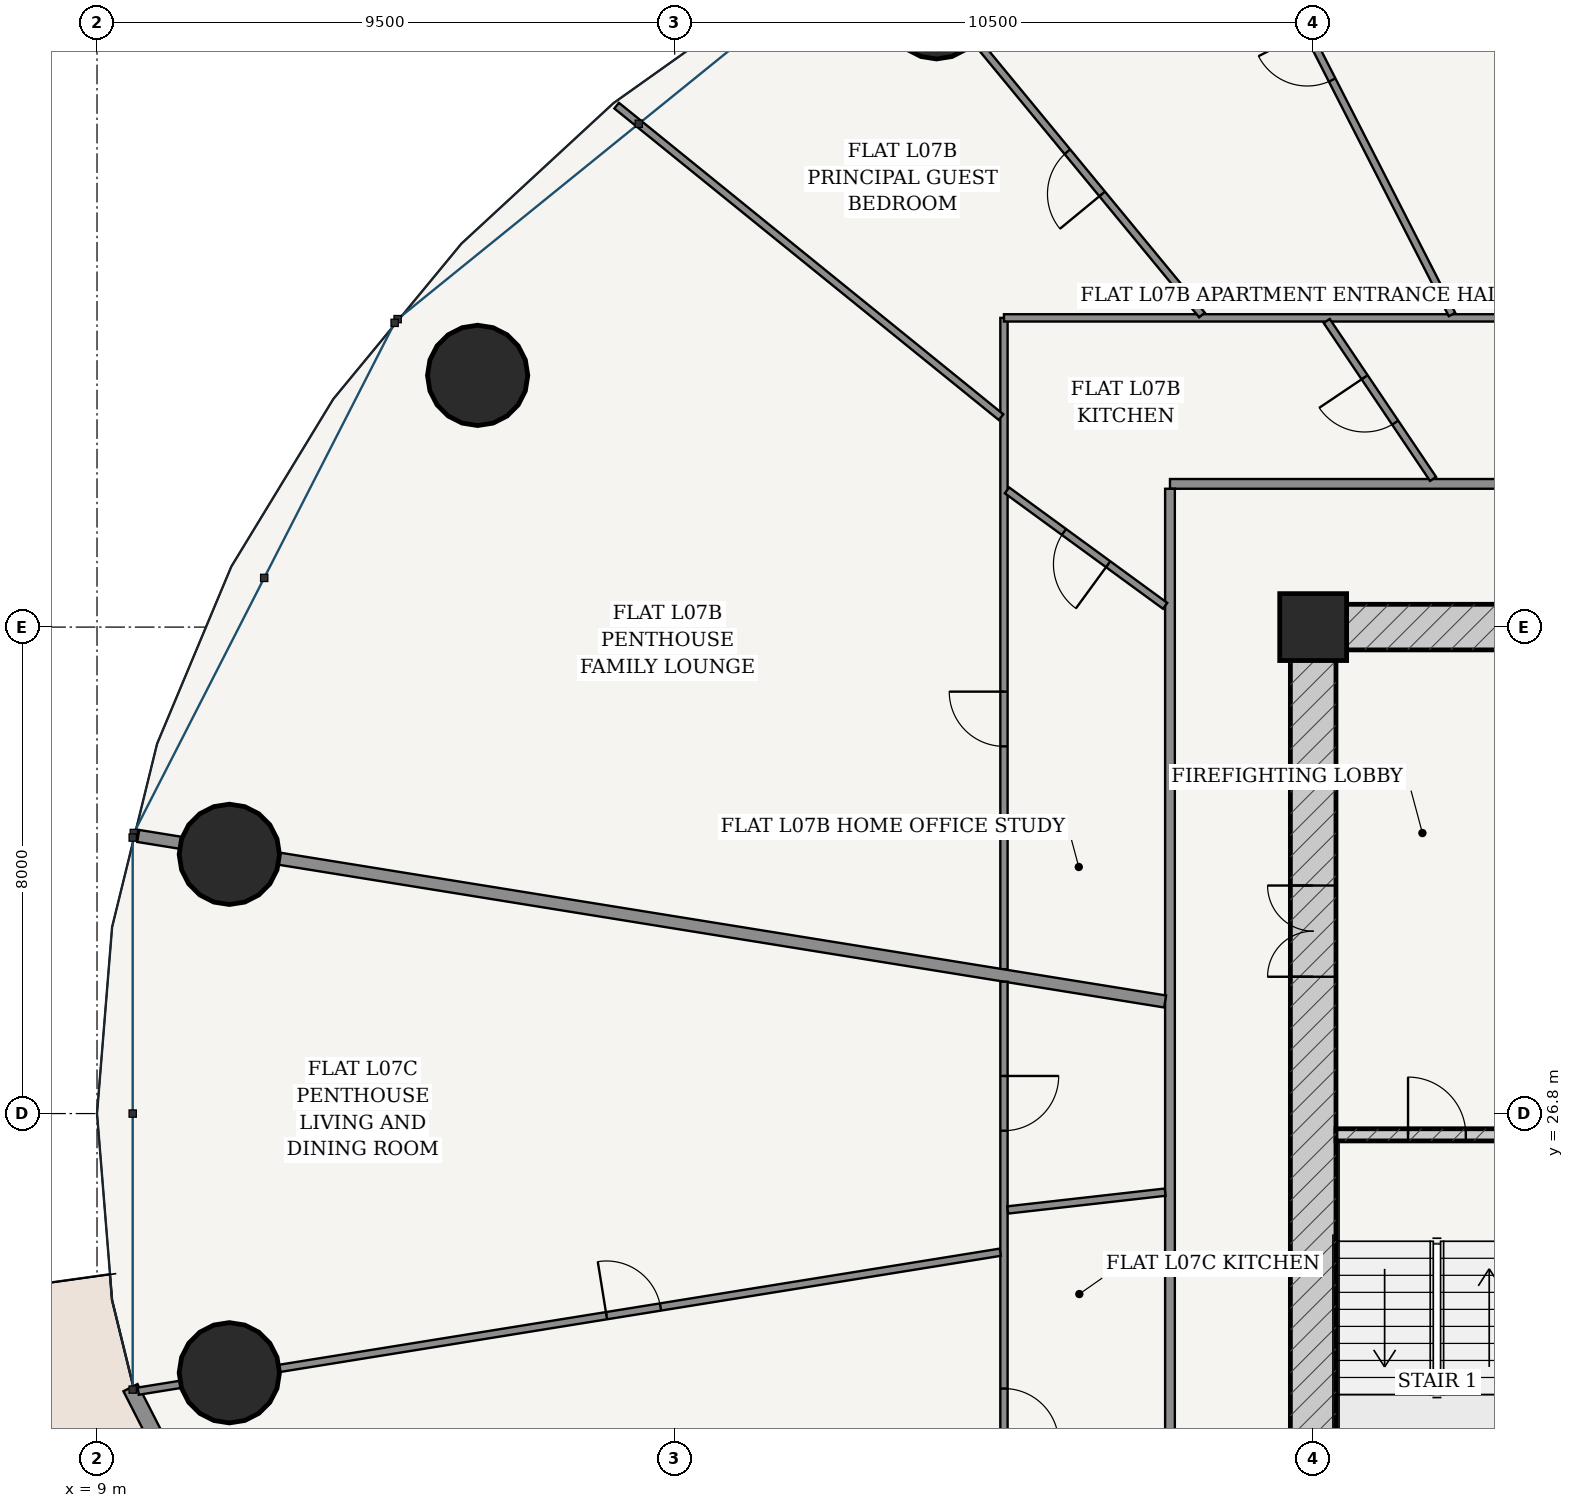
"""IFC4 building model, lengths in metres.
Left out: names, types, materials, properties, quantities, classifications, styles, units other than length and angle.
Written with IfcOpenShell. Run it as: python <this file> out.ifc"""

import sys

from ifc_helpers import new_model, si_unit, direction, frame, frame_2d, origin, origin_2d, place, context, subcontext, project, spatial, rectangle, hollow_circle, extrude, source, transform, mapped, element, fill, save


model = new_model("IFC4")
c1 = context("Model", 3, precision=1e-05, world=origin(), true_north=direction((-0.2419218956, 0.970295726276)))
c2 = subcontext(c1, "Body", "Model", "MODEL_VIEW")
j1 = project(units=[si_unit("LENGTHUNIT", "METRE"), si_unit("PLANEANGLEUNIT", "RADIAN")], contexts=[c1])
p1 = place(None, origin())
s1 = spatial("IfcSite", under=j1, at=p1, CompositionType="ELEMENT")
p2 = place(p1, origin())
s2 = spatial("IfcBuilding", under=s1, at=p2, CompositionType="ELEMENT")
p3 = place(p2, frame((0.0, 0.0, 31.2)))
s3 = spatial("IfcBuildingStorey", under=s2, at=p3, CompositionType="ELEMENT", Elevation=31.2)
p4 = place(p3, frame((29.0, 34.8, 0.0), z_axis=(0.0, 0.0, 1.0), x_axis=(1.0, 0.0, 0.0)))
e1 = element("IfcColumn", 1, at=p4, inside=s3, PredefinedType="COLUMN", context=c2, shape_type="SweptSolid", body=[
    extrude(rectangle(XDim=1.1, YDim=1.1, at=origin_2d()), origin(), (0.0, 0.0, 1.0), 3.6),
])
p5 = place(p3, frame((28.625, 34.8, 0.0), z_axis=(0.0, 0.0, 1.0), x_axis=(1.0, 0.0, 0.0)))
e2 = element("IfcWall", 2, at=p5, inside=s3, PredefinedType="SHEAR", context=c2, shape_type="SweptSolid", body=[
    extrude(rectangle(XDim=18.75, YDim=0.75, at=frame_2d((9.375, 0.0))), origin(), (0.0, 0.0, 1.0), 3.32),
])
p6 = place(p5, frame((8.95, 0.0, 0.0)))
e3 = element("IfcOpeningElement", 3, at=p6, cuts=e2, PredefinedType="OPENING", context=c2, shape_type="SweptSolid", body=[
    extrude(rectangle(XDim=0.85, YDim=2.1, at=frame_2d((0.425, 1.05))), frame((0.0, 0.385, 0.0), z_axis=(0.0, -1.0, 0.0), x_axis=(1.0, 0.0, 0.0)), (0.0, 0.0, 1.0), 0.77),
])
p7 = place(p3, frame((29.0, 19.175, 0.0), z_axis=(0.0, 0.0, 1.0), x_axis=(0.0, 1.0, 0.0)))
e4 = element("IfcWall", 4, at=p7, inside=s3, PredefinedType="SHEAR", context=c2, shape_type="SweptSolid", body=[
    extrude(rectangle(XDim=15.25, YDim=0.75, at=frame_2d((7.625, 0.0))), origin(), (0.0, 0.0, 1.0), 3.32),
])
p8 = place(p7, frame((9.875, 0.0, 0.0)))
e5 = element("IfcOpeningElement", 5, at=p8, cuts=e4, PredefinedType="OPENING", context=c2, shape_type="SweptSolid", body=[
    extrude(rectangle(XDim=1.5, YDim=2.2, at=frame_2d((0.75, 1.1))), frame((0.0, 0.385, 0.0), z_axis=(0.0, -1.0, 0.0), x_axis=(1.0, 0.0, 0.0)), (0.0, 0.0, 1.0), 0.77),
])
p9 = place(p3, frame((29.375, 26.45, 0.0), z_axis=(0.0, 0.0, 1.0), x_axis=(1.0, 0.0, 0.0)))
e6 = element("IfcWall", 6, at=p9, inside=s3, PredefinedType="SOLIDWALL", context=c2, shape_type="SweptSolid", body=[
    extrude(rectangle(XDim=3.32, YDim=0.2, at=frame_2d((1.66, 0.0))), origin(), (0.0, 0.0, 1.0), 3.32),
])
p10 = place(p9, frame((1.185, 0.0, 0.0)))
e7 = element("IfcOpeningElement", 7, at=p10, cuts=e6, PredefinedType="OPENING", context=c2, shape_type="SweptSolid", body=[
    extrude(rectangle(XDim=0.95, YDim=2.15, at=frame_2d((0.475, 1.075))), frame((0.0, 0.11, 0.0), z_axis=(0.0, -1.0, 0.0), x_axis=(1.0, 0.0, 0.0)), (0.0, 0.0, 1.0), 0.22),
])
for number, where, z_axis, x_axis in (
    (8, (22.805, 44.968, 0.0), (0.0, 0.0, 1.0), (1.0, 0.0, 0.0)),
    (9, (15.259, 38.939, 0.0), (0.0, 0.0, 1.0), (1.0, 0.0, 0.0)),
    (10, (11.176, 31.063, 0.0), (0.0, 0.0, 1.0), (1.0, 0.0, 0.0)),
    (11, (11.176, 22.537, 0.0), (0.0, 0.0, 1.0), (1.0, 0.0, 0.0)),
):
    element("IfcColumn", number, at=place(p3, frame(where, z_axis=z_axis, x_axis=x_axis)), inside=s3, PredefinedType="COLUMN", context=c2, shape_type="SweptSolid", body=[
        extrude(hollow_circle(Radius=0.825, WallThickness=0.05, at=origin_2d()), origin(), (0.0, 0.0, 1.0), 3.6),
    ])
p11 = place(p3, frame((9.55, 22.292, 0.0), z_axis=(0.0, 0.0, 1.0), x_axis=(0.455220575541, -0.890378698984, 0.0)))
e12 = element("IfcWall", 12, at=p11, inside=s3, PredefinedType="SOLIDWALL", context=c2, shape_type="SweptSolid", body=[
    extrude(rectangle(XDim=9.662, YDim=0.26, at=frame_2d((4.831, 0.0))), origin(), (0.0, 0.0, 1.0), 3.32),
])
p12 = place(p11, frame((4.156, 0.0, 0.0)))
e13 = element("IfcOpeningElement", 13, at=p12, cuts=e12, PredefinedType="OPENING", context=c2, shape_type="SweptSolid", body=[
    extrude(rectangle(XDim=1.35, YDim=2.2, at=frame_2d((0.675, 1.1))), frame((0.0, 0.14, 0.0), z_axis=(0.0, -1.0, 0.0), x_axis=(1.0, 0.0, 0.0)), (0.0, 0.0, 1.0), 0.28),
])
p13 = place(p3, frame((26.645, 37.155, 0.0), z_axis=(0.0, 0.0, 1.0), x_axis=(1.0, 0.0, 0.0)))
e14 = element("IfcWall", 14, at=p13, inside=s3, PredefinedType="PARTITIONING", context=c2, shape_type="SweptSolid", body=[
    extrude(rectangle(XDim=22.71, YDim=0.16, at=frame_2d((11.355, 0.0))), origin(), (0.0, 0.0, 1.0), 2.688),
])
p14 = place(p13, frame((7.446, 0.0, 0.0)))
e15 = element("IfcOpeningElement", 15, at=p14, cuts=e14, PredefinedType="OPENING", context=c2, shape_type="SweptSolid", body=[
    extrude(rectangle(XDim=0.98, YDim=2.2, at=frame_2d((0.49, 1.1))), frame((0.0, 0.09, 0.0), z_axis=(0.0, -1.0, 0.0), x_axis=(1.0, 0.0, 0.0)), (0.0, 0.0, 1.0), 0.18),
])
p15 = place(p3, frame((26.645, 16.525, 0.0), z_axis=(0.0, 0.0, 1.0), x_axis=(0.0, 1.0, 0.0)))
e16 = element("IfcWall", 16, at=p15, inside=s3, PredefinedType="PARTITIONING", context=c2, shape_type="SweptSolid", body=[
    extrude(rectangle(XDim=20.55, YDim=0.16, at=frame_2d((10.275, 0.0))), origin(), (0.0, 0.0, 1.0), 2.688),
])
p16 = place(p3, frame((23.915, 29.172, 0.0), z_axis=(0.0, 0.0, 1.0), x_axis=(0.0, 1.0, 0.0)))
e17 = element("IfcWall", 17, at=p16, inside=s3, PredefinedType="PARTITIONING", context=c2, shape_type="SweptSolid", body=[
    extrude(rectangle(XDim=10.713, YDim=0.12, at=frame_2d((5.356, 0.0))), origin(), (0.0, 0.0, 1.0), 2.688),
])
p17 = place(p16, frame((3.666, 0.0, 0.0)))
e18 = element("IfcOpeningElement", 18, at=p17, cuts=e17, PredefinedType="OPENING", context=c2, shape_type="SweptSolid", body=[
    extrude(rectangle(XDim=0.9, YDim=2.15, at=frame_2d((0.45, 1.075))), frame((0.0, 0.07, 0.0), z_axis=(0.0, -1.0, 0.0), x_axis=(1.0, 0.0, 0.0)), (0.0, 0.0, 1.0), 0.14),
])
p18 = place(p3, frame((23.915, 39.885, 0.0), z_axis=(0.0, 0.0, 1.0), x_axis=(1.0, 0.0, 0.0)))
e19 = element("IfcWall", 19, at=p18, inside=s3, PredefinedType="PARTITIONING", context=c2, shape_type="SweptSolid", body=[
    extrude(rectangle(XDim=20.671, YDim=0.12, at=frame_2d((10.336, 0.0))), origin(), (0.0, 0.0, 1.0), 2.688),
])
p19 = place(p18, frame((10.444, 0.0, 0.0)))
e20 = element("IfcOpeningElement", 20, at=p19, cuts=e19, PredefinedType="OPENING", context=c2, shape_type="SweptSolid", body=[
    extrude(rectangle(XDim=0.9, YDim=2.15, at=frame_2d((0.45, 1.075))), frame((0.0, 0.07, 0.0), z_axis=(0.0, -1.0, 0.0), x_axis=(1.0, 0.0, 0.0)), (0.0, 0.0, 1.0), 0.14),
])
p20 = place(p3, frame((31.283, 39.94, 0.0), z_axis=(0.0, 0.0, 1.0), x_axis=(-0.455131303234, 0.890424335256, 0.0)))
e21 = element("IfcWall", 21, at=p20, inside=s3, PredefinedType="PARTITIONING", context=c2, shape_type="SweptSolid", body=[
    extrude(rectangle(XDim=9.562, YDim=0.12, at=frame_2d((4.781, 0.0))), origin(), (0.0, 0.0, 1.0), 2.762),
])
p21 = place(p20, frame((4.331, 0.0, 0.0)))
e22 = element("IfcOpeningElement", 22, at=p21, cuts=e21, PredefinedType="OPENING", context=c2, shape_type="SweptSolid", body=[
    extrude(rectangle(XDim=0.9, YDim=2.15, at=frame_2d((0.45, 1.075))), frame((0.0, 0.07, 0.0), z_axis=(0.0, -1.0, 0.0), x_axis=(1.0, 0.0, 0.0)), (0.0, 0.0, 1.0), 0.14),
])
p22 = place(p3, frame((27.171, 39.933, 0.0), z_axis=(0.0, 0.0, 1.0), x_axis=(-0.636192172227, 0.771530634516, 0.0)))
e23 = element("IfcWall", 23, at=p22, inside=s3, PredefinedType="PARTITIONING", context=c2, shape_type="SweptSolid", body=[
    extrude(rectangle(XDim=8.186, YDim=0.12, at=frame_2d((4.093, 0.0))), origin(), (0.0, 0.0, 1.0), 2.688),
])
p23 = place(p22, frame((2.579, 0.0, 0.0)))
e24 = element("IfcOpeningElement", 24, at=p23, cuts=e23, PredefinedType="OPENING", context=c2, shape_type="SweptSolid", body=[
    extrude(rectangle(XDim=0.9, YDim=2.15, at=frame_2d((0.45, 1.075))), frame((0.0, 0.07, 0.0), z_axis=(0.0, -1.0, 0.0), x_axis=(1.0, 0.0, 0.0)), (0.0, 0.0, 1.0), 0.14),
])
p24 = place(p3, frame((23.867, 38.253, 0.0), z_axis=(0.0, 0.0, 1.0), x_axis=(-0.776936623447, 0.629578814087, 0.0)))
e25 = element("IfcWall", 25, at=p24, inside=s3, PredefinedType="PARTITIONING", context=c2, shape_type="SweptSolid", body=[
    extrude(rectangle(XDim=8.136, YDim=0.12, at=frame_2d((4.068, 0.0))), origin(), (0.0, 0.0, 1.0), 2.762),
])
p25 = place(p3, frame((30.972, 37.237, 0.0), z_axis=(0.0, 0.0, 1.0), x_axis=(-0.558563154585, 0.829461995717, 0.0)))
e26 = element("IfcWall", 26, at=p25, inside=s3, PredefinedType="PARTITIONING", context=c2, shape_type="SweptSolid", body=[
    extrude(rectangle(XDim=3.131, YDim=0.12, at=frame_2d((1.565, 0.0))), origin(), (0.0, 0.0, 1.0), 3.32),
])
p26 = place(p25, frame((1.115, 0.0, 0.0)))
e27 = element("IfcOpeningElement", 27, at=p26, cuts=e26, PredefinedType="OPENING", context=c2, shape_type="SweptSolid", body=[
    extrude(rectangle(XDim=0.9, YDim=2.15, at=frame_2d((0.45, 1.075))), frame((0.0, 0.07, 0.0), z_axis=(0.0, -1.0, 0.0), x_axis=(1.0, 0.0, 0.0)), (0.0, 0.0, 1.0), 0.14),
])
p27 = place(p3, frame((26.565, 35.15, 0.0), z_axis=(0.0, 0.0, 1.0), x_axis=(-0.807606444557, 0.589721824855, 0.0)))
e28 = element("IfcWall", 28, at=p27, inside=s3, PredefinedType="PARTITIONING", context=c2, shape_type="SweptSolid", body=[
    extrude(rectangle(XDim=3.219, YDim=0.12, at=frame_2d((1.61, 0.0))), origin(), (0.0, 0.0, 1.0), 3.32),
])
p28 = place(p27, frame((1.16, 0.0, 0.0)))
e29 = element("IfcOpeningElement", 29, at=p28, cuts=e28, PredefinedType="OPENING", context=c2, shape_type="SweptSolid", body=[
    extrude(rectangle(XDim=0.9, YDim=2.15, at=frame_2d((0.45, 1.075))), frame((0.0, 0.07, 0.0), z_axis=(0.0, -1.0, 0.0), x_axis=(1.0, 0.0, 0.0)), (0.0, 0.0, 1.0), 0.14),
])
p29 = place(p3, frame((26.565, 28.643, 0.0), z_axis=(0.0, 0.0, 1.0), x_axis=(-0.987255953651, 0.159140447344, 0.0)))
e30 = element("IfcWall", 30, at=p29, inside=s3, PredefinedType="PARTITIONING", context=c2, shape_type="SweptSolid", body=[
    extrude(rectangle(XDim=17.105, YDim=0.2, at=frame_2d((8.553, 0.0))), origin(), (0.0, 0.0, 1.0), 2.688),
])
p30 = place(p3, frame((23.915, 13.715, 0.0), z_axis=(0.0, 0.0, 1.0), x_axis=(0.0, 1.0, 0.0)))
e31 = element("IfcWall", 31, at=p30, inside=s3, PredefinedType="PARTITIONING", context=c2, shape_type="SweptSolid", body=[
    extrude(rectangle(XDim=15.253, YDim=0.12, at=frame_2d((7.626, 0.0))), origin(), (0.0, 0.0, 1.0), 2.688),
])
p31 = place(p30, frame((7.663, 0.0, 0.0)))
e32 = element("IfcOpeningElement", 32, at=p31, cuts=e31, PredefinedType="OPENING", context=c2, shape_type="SweptSolid", body=[
    extrude(rectangle(XDim=0.9, YDim=2.15, at=frame_2d((0.45, 1.075))), frame((0.0, 0.07, 0.0), z_axis=(0.0, -1.0, 0.0), x_axis=(1.0, 0.0, 0.0)), (0.0, 0.0, 1.0), 0.14),
])
p32 = place(p30, frame((12.803, 0.0, 0.0)))
e33 = element("IfcOpeningElement", 33, at=p32, cuts=e31, PredefinedType="OPENING", context=c2, shape_type="SweptSolid", body=[
    extrude(rectangle(XDim=0.9, YDim=2.15, at=frame_2d((0.45, 1.075))), frame((0.0, 0.07, 0.0), z_axis=(0.0, -1.0, 0.0), x_axis=(1.0, 0.0, 0.0)), (0.0, 0.0, 1.0), 0.14),
])
p33 = place(p3, frame((23.854, 24.52, 0.0), z_axis=(0.0, 0.0, 1.0), x_axis=(-0.987258444847, -0.159124991997, 0.0)))
e34 = element("IfcWall", 34, at=p33, inside=s3, PredefinedType="PARTITIONING", context=c2, shape_type="SweptSolid", body=[
    extrude(rectangle(XDim=14.359, YDim=0.12, at=frame_2d((7.18, 0.0))), origin(), (0.0, 0.0, 1.0), 2.688),
])
p34 = place(p33, frame((5.659, 0.0, 0.0)))
e35 = element("IfcOpeningElement", 35, at=p34, cuts=e34, PredefinedType="OPENING", context=c2, shape_type="SweptSolid", body=[
    extrude(rectangle(XDim=0.9, YDim=2.15, at=frame_2d((0.45, 1.075))), frame((0.0, 0.07, 0.0), z_axis=(0.0, -1.0, 0.0), x_axis=(1.0, 0.0, 0.0)), (0.0, 0.0, 1.0), 0.14),
])
p35 = place(p3, frame((26.565, 25.507, 0.0), z_axis=(0.0, 0.0, 1.0), x_axis=(-0.993676271227, -0.112282981789, 0.0)))
e36 = element("IfcWall", 36, at=p35, inside=s3, PredefinedType="PARTITIONING", context=c2, shape_type="SweptSolid", body=[
    extrude(rectangle(XDim=2.605, YDim=0.12, at=frame_2d((1.302, 0.0))), origin(), (0.0, 0.0, 1.0), 3.32),
])
m1 = source(origin(), c2, "Body", "SweptSolid", [
    extrude(rectangle(XDim=1.5, YDim=2.2, at=frame_2d((0.75, 1.1))), frame((0.0, 0.025, 0.0), z_axis=(0.0, -1.0, 0.0), x_axis=(1.0, 0.0, 0.0)), (0.0, 0.0, 1.0), 0.05),
])
p36 = place(p8, origin())
e37 = element("IfcDoor", 37, at=p36, inside=s3, OperationType="DOUBLE_DOOR_SINGLE_SWING", PredefinedType="DOOR", context=c2, shape_type="MappedRepresentation", body=[
    mapped(m1, transform((0.0, 0.0, 0.0), scale=1.0)),
])
fill(e5, e37)
m2 = source(origin(), c2, "Body", "SweptSolid", [
    extrude(rectangle(XDim=0.95, YDim=2.15, at=frame_2d((0.475, 1.075))), frame((0.0, 0.025, 0.0), z_axis=(0.0, -1.0, 0.0), x_axis=(1.0, 0.0, 0.0)), (0.0, 0.0, 1.0), 0.05),
])
p37 = place(p10, origin())
e38 = element("IfcDoor", 38, at=p37, inside=s3, OperationType="SINGLE_SWING_LEFT", PredefinedType="DOOR", context=c2, shape_type="MappedRepresentation", body=[
    mapped(m2, transform((0.0, 0.0, 0.0), scale=1.0)),
])
fill(e7, e38)
m3 = source(origin(), c2, "Body", "SweptSolid", [
    extrude(rectangle(XDim=0.9, YDim=2.15, at=frame_2d((0.45, 1.075))), frame((0.0, 0.025, 0.0), z_axis=(0.0, -1.0, 0.0), x_axis=(1.0, 0.0, 0.0)), (0.0, 0.0, 1.0), 0.05),
])
p38 = place(p26, origin())
e39 = element("IfcDoor", 39, at=p38, inside=s3, OperationType="SINGLE_SWING_RIGHT", PredefinedType="DOOR", context=c2, shape_type="MappedRepresentation", body=[
    mapped(m3, transform((0.0, 0.0, 0.0), scale=1.0)),
])
fill(e27, e39)
p39 = place(p28, origin())
e40 = element("IfcDoor", 40, at=p39, inside=s3, OperationType="SINGLE_SWING_LEFT", PredefinedType="DOOR", context=c2, shape_type="MappedRepresentation", body=[
    mapped(m3, transform((0.0, 0.0, 0.0), scale=1.0)),
])
fill(e29, e40)
p40 = place(p21, origin())
e41 = element("IfcDoor", 41, at=p40, inside=s3, OperationType="SINGLE_SWING_RIGHT", PredefinedType="DOOR", context=c2, shape_type="MappedRepresentation", body=[
    mapped(m3, transform((0.0, 0.0, 0.0), scale=1.0)),
])
fill(e22, e41)
p41 = place(p23, origin())
e42 = element("IfcDoor", 42, at=p41, inside=s3, OperationType="SINGLE_SWING_LEFT", PredefinedType="DOOR", context=c2, shape_type="MappedRepresentation", body=[
    mapped(m3, transform((0.0, 0.0, 0.0), scale=1.0)),
])
fill(e24, e42)
p42 = place(p17, origin())
e43 = element("IfcDoor", 43, at=p42, inside=s3, OperationType="SINGLE_SWING_RIGHT", PredefinedType="DOOR", context=c2, shape_type="MappedRepresentation", body=[
    mapped(m3, transform((0.0, 0.0, 0.0), scale=1.0)),
])
fill(e18, e43)
p43 = place(p34, frame((0.9, 0.0, 0.0), z_axis=(0.0, 0.0, 1.0), x_axis=(-1.0, 0.0, 0.0)))
e44 = element("IfcDoor", 44, at=p43, inside=s3, OperationType="SINGLE_SWING_LEFT", PredefinedType="DOOR", context=c2, shape_type="MappedRepresentation", body=[
    mapped(m3, transform((0.0, 0.0, 0.0), scale=1.0)),
])
fill(e35, e44)
p44 = place(p31, frame((0.9, 0.0, 0.0), z_axis=(0.0, 0.0, 1.0), x_axis=(-1.0, 0.0, 0.0)))
e45 = element("IfcDoor", 45, at=p44, inside=s3, OperationType="SINGLE_SWING_RIGHT", PredefinedType="DOOR", context=c2, shape_type="MappedRepresentation", body=[
    mapped(m3, transform((0.0, 0.0, 0.0), scale=1.0)),
])
fill(e32, e45)
p45 = place(p32, frame((0.9, 0.0, 0.0), z_axis=(0.0, 0.0, 1.0), x_axis=(-1.0, 0.0, 0.0)))
e46 = element("IfcDoor", 46, at=p45, inside=s3, OperationType="SINGLE_SWING_LEFT", PredefinedType="DOOR", context=c2, shape_type="MappedRepresentation", body=[
    mapped(m3, transform((0.0, 0.0, 0.0), scale=1.0)),
])
fill(e33, e46)
save(model, sys.argv[1])
